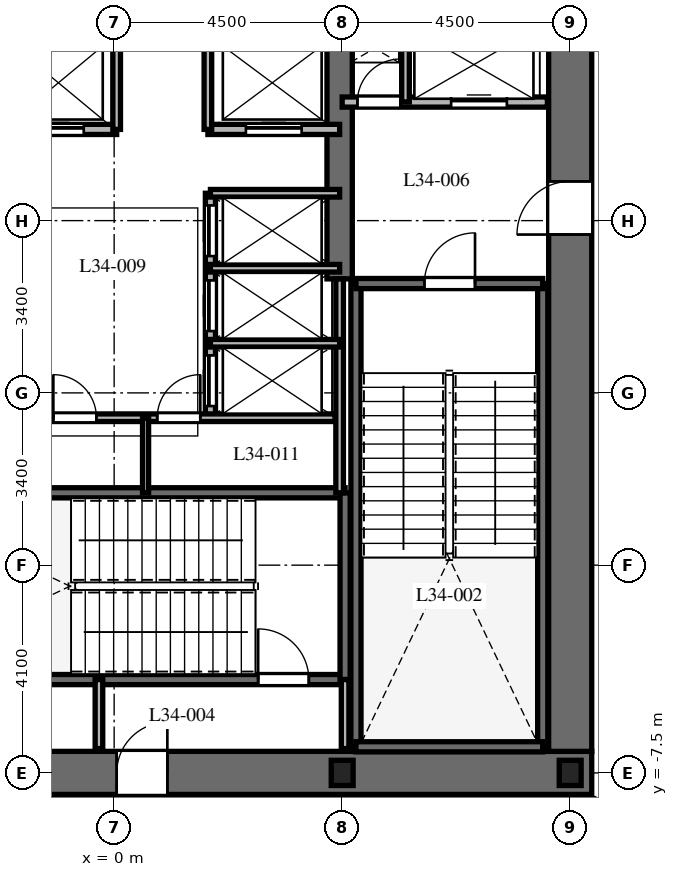
"""IFC4 building model, lengths in metres.
Left out: names, types, materials, properties, quantities, classifications, styles, units other than length and angle.
Written with IfcOpenShell. Run it as: python <this file> out.ifc"""

import sys

from ifc_helpers import new_model, si_unit, direction, frame, frame_2d, origin, origin_2d, place, context, subcontext, project, spatial, rectangle, i_section, extrude, element, fill, save


model = new_model("IFC4")
c1 = context("Model", 3, precision=1e-05, world=origin(), true_north=direction((0.0, 1.0)))
c2 = subcontext(c1, "Body", "Model", "MODEL_VIEW")
j1 = project(units=[si_unit("LENGTHUNIT", "METRE"), si_unit("PLANEANGLEUNIT", "RADIAN")], contexts=[c1])
p1 = place(None, origin())
s1 = spatial("IfcSite", under=j1, at=p1, CompositionType="ELEMENT")
p2 = place(p1, origin())
s2 = spatial("IfcBuilding", under=s1, at=p2, CompositionType="ELEMENT")
p3 = place(p2, frame((0.0, 0.0, 139.5)))
s3 = spatial("IfcBuildingStorey", under=s2, at=p3, CompositionType="ELEMENT", Elevation=139.5)
p4 = place(p3, frame((-9.425, -7.5, 0.0), z_axis=(0.0, 0.0, 1.0), x_axis=(1.0, 0.0, 0.0)))
e1 = element("IfcWall", 1, at=p4, inside=s3, PredefinedType="SHEAR", context=c2, shape_type="SweptSolid", body=[
    extrude(rectangle(XDim=18.85, YDim=0.85, at=frame_2d((9.425, 0.0))), origin(), (0.0, 0.0, 1.0), 4.8),
])
p5 = place(p4, frame((9.475, 0.0, 0.0)))
e2 = element("IfcOpeningElement", 2, at=p5, cuts=e1, PredefinedType="OPENING", context=c2, shape_type="SweptSolid", body=[
    extrude(rectangle(XDim=1.0, YDim=2.15, at=frame_2d((0.5, 1.075))), frame((0.0, 0.435, 0.0), z_axis=(0.0, -1.0, 0.0), x_axis=(1.0, 0.0, 0.0)), (0.0, 0.0, 1.0), 0.87),
])
p6 = place(p3, frame((9.0, -7.075, 0.0), z_axis=(0.0, 0.0, 1.0), x_axis=(0.0, 1.0, 0.0)))
e3 = element("IfcWall", 3, at=p6, inside=s3, PredefinedType="SHEAR", context=c2, shape_type="SweptSolid", body=[
    extrude(rectangle(XDim=14.15, YDim=0.85, at=frame_2d((7.075, 0.0))), origin(), (0.0, 0.0, 1.0), 4.8),
])
p7 = place(p6, frame((10.2, 0.0, 0.0)))
e4 = element("IfcOpeningElement", 4, at=p7, cuts=e3, PredefinedType="OPENING", context=c2, shape_type="SweptSolid", body=[
    extrude(rectangle(XDim=1.05, YDim=2.15, at=frame_2d((0.525, 1.075))), frame((0.0, 0.435, 0.0), z_axis=(0.0, -1.0, 0.0), x_axis=(1.0, 0.0, 0.0)), (0.0, 0.0, 1.0), 0.87),
])
p8 = place(p3, frame((4.45, 2.25, 0.0), z_axis=(0.0, 0.0, 1.0), x_axis=(0.0, 1.0, 0.0)))
e5 = element("IfcWall", 5, at=p8, inside=s3, PredefinedType="SHEAR", context=c2, shape_type="SweptSolid", body=[
    extrude(rectangle(XDim=4.825, YDim=0.5, at=frame_2d((2.413, 0.0))), origin(), (0.0, 0.0, 1.0), 4.8),
])
for number, where, z_axis, x_axis in (
    (6, (4.772, -6.985, 0.0), (0.0, 0.0, 1.0), (0.0, 1.0, 0.0)),
    (7, (8.458, -6.985, 0.0), (0.0, 0.0, 1.0), (0.0, 1.0, 0.0)),
):
    element("IfcWall", number, at=place(p3, frame(where, z_axis=z_axis, x_axis=x_axis)), inside=s3, PredefinedType="SHEAR", context=c2, shape_type="SweptSolid", body=[
        extrude(rectangle(XDim=9.143, YDim=0.2, at=frame_2d((4.572, 0.0))), origin(), (0.0, 0.0, 1.0), 4.8),
    ])
p9 = place(p3, frame((4.772, -6.985, 0.0), z_axis=(0.0, 0.0, 1.0), x_axis=(1.0, 0.0, 0.0)))
e8 = element("IfcWall", 8, at=p9, inside=s3, PredefinedType="SHEAR", context=c2, shape_type="SweptSolid", body=[
    extrude(rectangle(XDim=3.686, YDim=0.2, at=frame_2d((1.843, 0.0))), origin(), (0.0, 0.0, 1.0), 4.8),
])
p10 = place(p3, frame((4.772, 2.158, 0.0), z_axis=(0.0, 0.0, 1.0), x_axis=(1.0, 0.0, 0.0)))
e9 = element("IfcWall", 9, at=p10, inside=s3, PredefinedType="SHEAR", context=c2, shape_type="SweptSolid", body=[
    extrude(rectangle(XDim=3.686, YDim=0.2, at=frame_2d((1.843, 0.0))), origin(), (0.0, 0.0, 1.0), 4.8),
])
p11 = place(p10, frame((1.35, 0.0, 0.0)))
e10 = element("IfcOpeningElement", 10, at=p11, cuts=e9, PredefinedType="OPENING", context=c2, shape_type="SweptSolid", body=[
    extrude(rectangle(XDim=1.0, YDim=2.15, at=frame_2d((0.5, 1.075))), frame((0.0, 0.11, 0.0), z_axis=(0.0, -1.0, 0.0), x_axis=(1.0, 0.0, 0.0)), (0.0, 0.0, 1.0), 0.22),
])
p12 = place(p3, frame((-4.608, -5.658, 0.0), z_axis=(0.0, 0.0, 1.0), x_axis=(1.0, 0.0, 0.0)))
e11 = element("IfcWall", 11, at=p12, inside=s3, PredefinedType="SHEAR", context=c2, shape_type="SweptSolid", body=[
    extrude(rectangle(XDim=9.166, YDim=0.2, at=frame_2d((4.583, 0.0))), origin(), (0.0, 0.0, 1.0), 4.8),
])
p13 = place(p12, frame((7.45, 0.0, 0.0)))
e12 = element("IfcOpeningElement", 12, at=p13, cuts=e11, PredefinedType="OPENING", context=c2, shape_type="SweptSolid", body=[
    extrude(rectangle(XDim=1.0, YDim=2.15, at=frame_2d((0.5, 1.075))), frame((0.0, 0.11, 0.0), z_axis=(0.0, -1.0, 0.0), x_axis=(1.0, 0.0, 0.0)), (0.0, 0.0, 1.0), 0.22),
])
p14 = place(p3, frame((-4.608, -1.972, 0.0), z_axis=(0.0, 0.0, 1.0), x_axis=(1.0, 0.0, 0.0)))
e13 = element("IfcWall", 13, at=p14, inside=s3, PredefinedType="SHEAR", context=c2, shape_type="SweptSolid", body=[
    extrude(rectangle(XDim=9.166, YDim=0.2, at=frame_2d((4.583, 0.0))), origin(), (0.0, 0.0, 1.0), 4.8),
])
p15 = place(p3, frame((4.558, -5.658, 0.0), z_axis=(0.0, 0.0, 1.0), x_axis=(0.0, 1.0, 0.0)))
e14 = element("IfcWall", 14, at=p15, inside=s3, PredefinedType="SHEAR", context=c2, shape_type="SweptSolid", body=[
    extrude(rectangle(XDim=3.686, YDim=0.2, at=frame_2d((1.843, 0.0))), origin(), (0.0, 0.0, 1.0), 4.8),
])
for number, where, z_axis, x_axis in (
    (15, (4.5, -7.5, 0.0), (0.0, 0.0, 1.0), (1.0, 0.0, 0.0)),
    (16, (9.0, -7.5, 0.0), (0.0, 0.0, 1.0), (1.0, 0.0, 0.0)),
):
    element("IfcColumn", number, at=place(p3, frame(where, z_axis=z_axis, x_axis=x_axis)), inside=s3, PredefinedType="COLUMN", context=c2, shape_type="SweptSolid", body=[
        extrude(i_section(OverallWidth=0.432, OverallDepth=0.498, WebThickness=0.056, FlangeThickness=0.089, at=origin_2d()), origin(), (0.0, 0.0, 1.0), 4.8),
    ])
for number, where, z_axis, x_axis in (
    (17, (-0.3, -7.02, 0.0), (0.0, 0.0, 1.0), (0.0, 1.0, 0.0)),
    (18, (4.558, -7.02, 0.0), (0.0, 0.0, 1.0), (0.0, 1.0, 0.0)),
):
    element("IfcWall", number, at=place(p3, frame(where, z_axis=z_axis, x_axis=x_axis)), inside=s3, PredefinedType="PARTITIONING", context=c2, shape_type="SweptSolid", body=[
        extrude(rectangle(XDim=1.362, YDim=0.15, at=frame_2d((0.681, 0.0))), origin(), (0.0, 0.0, 1.0), 4.5),
    ])
p16 = place(p3, frame((4.5, 5.74, 0.0), z_axis=(0.0, 0.0, 1.0), x_axis=(1.0, 0.0, 0.0)))
e19 = element("IfcWall", 19, at=p16, inside=s3, PredefinedType="PARTITIONING", context=c2, shape_type="SweptSolid", body=[
    extrude(rectangle(XDim=4.05, YDim=0.2, at=frame_2d((2.025, 0.0))), origin(), (0.0, 0.0, 1.0), 4.5),
])
p17 = place(p16, frame((0.3, 0.0, 0.0)))
e20 = element("IfcOpeningElement", 20, at=p17, cuts=e19, PredefinedType="OPENING", context=c2, shape_type="SweptSolid", body=[
    extrude(rectangle(XDim=0.85, YDim=2.03, at=frame_2d((0.425, 1.015))), frame((0.0, 0.11, 0.0), z_axis=(0.0, -1.0, 0.0), x_axis=(1.0, 0.0, 0.0)), (0.0, 0.0, 1.0), 0.22),
])
p18 = place(p16, frame((2.15, 0.0, 0.0)))
e21 = element("IfcOpeningElement", 21, at=p18, cuts=e19, PredefinedType="OPENING", context=c2, shape_type="SweptSolid", body=[
    extrude(rectangle(XDim=1.1, YDim=2.2, at=frame_2d((0.55, 1.1))), frame((0.0, 0.11, 0.0), z_axis=(0.0, -1.0, 0.0), x_axis=(1.0, 0.0, 0.0)), (0.0, 0.0, 1.0), 0.22),
])
p19 = place(p3, frame((5.75, 5.74, 0.0), z_axis=(0.0, 0.0, 1.0), x_axis=(0.0, 1.0, 0.0)))
e22 = element("IfcWall", 22, at=p19, inside=s3, PredefinedType="PARTITIONING", context=c2, shape_type="SweptSolid", body=[
    extrude(rectangle(XDim=1.41, YDim=0.15, at=frame_2d((0.705, 0.0))), origin(), (0.0, 0.0, 1.0), 4.5),
])
p20 = place(p3, frame((-4.45, 5.2, 0.0), z_axis=(0.0, 0.0, 1.0), x_axis=(1.0, 0.0, 0.0)))
e23 = element("IfcWall", 23, at=p20, inside=s3, PredefinedType="PARTITIONING", context=c2, shape_type="SweptSolid", body=[
    extrude(rectangle(XDim=4.5, YDim=0.2, at=frame_2d((2.25, 0.0))), origin(), (0.0, 0.0, 1.0), 4.5),
])
p21 = place(p20, frame((0.65, 0.0, 0.0)))
e24 = element("IfcOpeningElement", 24, at=p21, cuts=e23, PredefinedType="OPENING", context=c2, shape_type="SweptSolid", body=[
    extrude(rectangle(XDim=1.0, YDim=2.2, at=frame_2d((0.5, 1.1))), frame((0.0, 0.11, 0.0), z_axis=(0.0, -1.0, 0.0), x_axis=(1.0, 0.0, 0.0)), (0.0, 0.0, 1.0), 0.22),
])
p22 = place(p20, frame((2.85, 0.0, 0.0)))
e25 = element("IfcOpeningElement", 25, at=p22, cuts=e23, PredefinedType="OPENING", context=c2, shape_type="SweptSolid", body=[
    extrude(rectangle(XDim=1.0, YDim=2.2, at=frame_2d((0.5, 1.1))), frame((0.0, 0.11, 0.0), z_axis=(0.0, -1.0, 0.0), x_axis=(1.0, 0.0, 0.0)), (0.0, 0.0, 1.0), 0.22),
])
p23 = place(p3, frame((1.85, 5.2, 0.0), z_axis=(0.0, 0.0, 1.0), x_axis=(1.0, 0.0, 0.0)))
e26 = element("IfcWall", 26, at=p23, inside=s3, PredefinedType="PARTITIONING", context=c2, shape_type="SweptSolid", body=[
    extrude(rectangle(XDim=2.6, YDim=0.2, at=frame_2d((1.3, 0.0))), origin(), (0.0, 0.0, 1.0), 4.5),
])
p24 = place(p23, frame((0.75, 0.0, 0.0)))
e27 = element("IfcOpeningElement", 27, at=p24, cuts=e26, PredefinedType="OPENING", context=c2, shape_type="SweptSolid", body=[
    extrude(rectangle(XDim=1.1, YDim=2.2, at=frame_2d((0.55, 1.1))), frame((0.0, 0.11, 0.0), z_axis=(0.0, -1.0, 0.0), x_axis=(1.0, 0.0, 0.0)), (0.0, 0.0, 1.0), 0.22),
])
for number, where, z_axis, x_axis in (
    (28, (0.05, 5.2, 0.0), (0.0, 0.0, 1.0), (0.0, 1.0, 0.0)),
    (29, (1.85, 5.2, 0.0), (0.0, 0.0, 1.0), (0.0, 1.0, 0.0)),
):
    element("IfcWall", number, at=place(p3, frame(where, z_axis=z_axis, x_axis=x_axis)), inside=s3, PredefinedType="PARTITIONING", context=c2, shape_type="SweptSolid", body=[
        extrude(rectangle(XDim=1.95, YDim=0.15, at=frame_2d((0.975, 0.0))), origin(), (0.0, 0.0, 1.0), 4.5),
    ])
p25 = place(p3, frame((4.45, -1.972, 0.0), z_axis=(0.0, 0.0, 1.0), x_axis=(0.0, 1.0, 0.0)))
e30 = element("IfcWall", 30, at=p25, inside=s3, PredefinedType="PARTITIONING", context=c2, shape_type="SweptSolid", body=[
    extrude(rectangle(XDim=4.222, YDim=0.15, at=frame_2d((2.111, 0.0))), origin(), (0.0, 0.0, 1.0), 4.5),
])
p26 = place(p3, frame((1.9, -0.5, 0.0), z_axis=(0.0, 0.0, 1.0), x_axis=(0.0, 1.0, 0.0)))
e31 = element("IfcWall", 31, at=p26, inside=s3, PredefinedType="PARTITIONING", context=c2, shape_type="SweptSolid", body=[
    extrude(rectangle(XDim=4.44, YDim=0.2, at=frame_2d((2.22, 0.0))), origin(), (0.0, 0.0, 1.0), 4.5),
])
p27 = place(p26, frame((0.24, 0.0, 0.0)))
e32 = element("IfcOpeningElement", 32, at=p27, cuts=e31, PredefinedType="OPENING", context=c2, shape_type="SweptSolid", body=[
    extrude(rectangle(XDim=1.0, YDim=2.2, at=frame_2d((0.5, 1.1))), frame((0.0, 0.11, 0.0), z_axis=(0.0, -1.0, 0.0), x_axis=(1.0, 0.0, 0.0)), (0.0, 0.0, 1.0), 0.22),
])
p28 = place(p26, frame((1.72, 0.0, 0.0)))
e33 = element("IfcOpeningElement", 33, at=p28, cuts=e31, PredefinedType="OPENING", context=c2, shape_type="SweptSolid", body=[
    extrude(rectangle(XDim=1.0, YDim=2.2, at=frame_2d((0.5, 1.1))), frame((0.0, 0.11, 0.0), z_axis=(0.0, -1.0, 0.0), x_axis=(1.0, 0.0, 0.0)), (0.0, 0.0, 1.0), 0.22),
])
p29 = place(p26, frame((3.2, 0.0, 0.0)))
e34 = element("IfcOpeningElement", 34, at=p29, cuts=e31, PredefinedType="OPENING", context=c2, shape_type="SweptSolid", body=[
    extrude(rectangle(XDim=1.0, YDim=2.2, at=frame_2d((0.5, 1.1))), frame((0.0, 0.11, 0.0), z_axis=(0.0, -1.0, 0.0), x_axis=(1.0, 0.0, 0.0)), (0.0, 0.0, 1.0), 0.22),
])
for number, where, z_axis, x_axis in (
    (35, (1.9, 3.94, 0.0), (0.0, 0.0, 1.0), (1.0, 0.0, 0.0)),
    (36, (1.9, 0.98, 0.0), (0.0, 0.0, 1.0), (1.0, 0.0, 0.0)),
    (37, (1.9, 2.46, 0.0), (0.0, 0.0, 1.0), (1.0, 0.0, 0.0)),
):
    element("IfcWall", number, at=place(p3, frame(where, z_axis=z_axis, x_axis=x_axis)), inside=s3, PredefinedType="PARTITIONING", context=c2, shape_type="SweptSolid", body=[
        extrude(rectangle(XDim=2.55, YDim=0.15, at=frame_2d((1.275, 0.0))), origin(), (0.0, 0.0, 1.0), 4.5),
    ])
p30 = place(p3, frame((-4.36, -0.49, 0.0), z_axis=(0.0, 0.0, 1.0), x_axis=(1.0, 0.0, 0.0)))
e38 = element("IfcWall", 38, at=p30, inside=s3, PredefinedType="PARTITIONING", context=c2, shape_type="SweptSolid", body=[
    extrude(rectangle(XDim=8.72, YDim=0.15, at=frame_2d((4.36, 0.0))), origin(), (0.0, 0.0, 1.0), 4.5),
])
p31 = place(p30, frame((3.16, 0.0, 0.0)))
e39 = element("IfcOpeningElement", 39, at=p31, cuts=e38, PredefinedType="OPENING", context=c2, shape_type="SweptSolid", body=[
    extrude(rectangle(XDim=0.85, YDim=2.03, at=frame_2d((0.425, 1.015))), frame((0.0, 0.085, 0.0), z_axis=(0.0, -1.0, 0.0), x_axis=(1.0, 0.0, 0.0)), (0.0, 0.0, 1.0), 0.17),
])
p32 = place(p30, frame((5.21, 0.0, 0.0)))
e40 = element("IfcOpeningElement", 40, at=p32, cuts=e38, PredefinedType="OPENING", context=c2, shape_type="SweptSolid", body=[
    extrude(rectangle(XDim=0.85, YDim=2.03, at=frame_2d((0.425, 1.015))), frame((0.0, 0.085, 0.0), z_axis=(0.0, -1.0, 0.0), x_axis=(1.0, 0.0, 0.0)), (0.0, 0.0, 1.0), 0.17),
])
p33 = place(p3, frame((0.62, -1.972, 0.0), z_axis=(0.0, 0.0, 1.0), x_axis=(0.0, 1.0, 0.0)))
e41 = element("IfcWall", 41, at=p33, inside=s3, PredefinedType="PARTITIONING", context=c2, shape_type="SweptSolid", body=[
    extrude(rectangle(XDim=1.472, YDim=0.12, at=frame_2d((0.736, 0.0))), origin(), (0.0, 0.0, 1.0), 4.5),
])
p34 = place(p11, origin())
e42 = element("IfcDoor", 42, at=p34, inside=s3, OperationType="SINGLE_SWING_RIGHT", PredefinedType="DOOR", context=c2, shape_type="SweptSolid", body=[
    extrude(rectangle(XDim=1.0, YDim=2.15, at=frame_2d((0.5, 1.075))), frame((0.0, 0.025, 0.0), z_axis=(0.0, -1.0, 0.0), x_axis=(1.0, 0.0, 0.0)), (0.0, 0.0, 1.0), 0.05),
])
fill(e10, e42)
p35 = place(p13, origin())
e43 = element("IfcDoor", 43, at=p35, inside=s3, OperationType="SINGLE_SWING_LEFT", PredefinedType="DOOR", context=c2, shape_type="SweptSolid", body=[
    extrude(rectangle(XDim=1.0, YDim=2.15, at=frame_2d((0.5, 1.075))), frame((0.0, 0.025, 0.0), z_axis=(0.0, -1.0, 0.0), x_axis=(1.0, 0.0, 0.0)), (0.0, 0.0, 1.0), 0.05),
])
fill(e12, e43)
p36 = place(p5, origin())
e44 = element("IfcDoor", 44, at=p36, inside=s3, OperationType="SINGLE_SWING_RIGHT", PredefinedType="DOOR", context=c2, shape_type="SweptSolid", body=[
    extrude(rectangle(XDim=1.0, YDim=2.15, at=frame_2d((0.5, 1.075))), frame((0.0, 0.025, 0.0), z_axis=(0.0, -1.0, 0.0), x_axis=(1.0, 0.0, 0.0)), (0.0, 0.0, 1.0), 0.05),
])
fill(e2, e44)
p37 = place(p7, origin())
e45 = element("IfcDoor", 45, at=p37, inside=s3, OperationType="SINGLE_SWING_LEFT", PredefinedType="DOOR", context=c2, shape_type="SweptSolid", body=[
    extrude(rectangle(XDim=1.05, YDim=2.15, at=frame_2d((0.525, 1.075))), frame((0.0, 0.025, 0.0), z_axis=(0.0, -1.0, 0.0), x_axis=(1.0, 0.0, 0.0)), (0.0, 0.0, 1.0), 0.05),
])
fill(e4, e45)
p38 = place(p17, origin())
e46 = element("IfcDoor", 46, at=p38, inside=s3, OperationType="SINGLE_SWING_RIGHT", PredefinedType="DOOR", context=c2, shape_type="SweptSolid", body=[
    extrude(rectangle(XDim=0.85, YDim=2.03, at=frame_2d((0.425, 1.015))), frame((0.0, 0.025, 0.0), z_axis=(0.0, -1.0, 0.0), x_axis=(1.0, 0.0, 0.0)), (0.0, 0.0, 1.0), 0.05),
])
fill(e20, e46)
p39 = place(p18, origin())
e47 = element("IfcDoor", 47, at=p39, inside=s3, OperationType="SLIDING_TO_RIGHT", PredefinedType="DOOR", context=c2, shape_type="SweptSolid", body=[
    extrude(rectangle(XDim=1.1, YDim=2.2, at=frame_2d((0.55, 1.1))), frame((0.0, 0.025, 0.0), z_axis=(0.0, -1.0, 0.0), x_axis=(1.0, 0.0, 0.0)), (0.0, 0.0, 1.0), 0.05),
])
fill(e21, e47)
p40 = place(p22, origin())
e48 = element("IfcDoor", 48, at=p40, inside=s3, OperationType="SLIDING_TO_RIGHT", PredefinedType="DOOR", context=c2, shape_type="SweptSolid", body=[
    extrude(rectangle(XDim=1.0, YDim=2.2, at=frame_2d((0.5, 1.1))), frame((0.0, 0.025, 0.0), z_axis=(0.0, -1.0, 0.0), x_axis=(1.0, 0.0, 0.0)), (0.0, 0.0, 1.0), 0.05),
])
fill(e25, e48)
p41 = place(p24, origin())
e49 = element("IfcDoor", 49, at=p41, inside=s3, OperationType="SLIDING_TO_RIGHT", PredefinedType="DOOR", context=c2, shape_type="SweptSolid", body=[
    extrude(rectangle(XDim=1.1, YDim=2.2, at=frame_2d((0.55, 1.1))), frame((0.0, 0.025, 0.0), z_axis=(0.0, -1.0, 0.0), x_axis=(1.0, 0.0, 0.0)), (0.0, 0.0, 1.0), 0.05),
])
fill(e27, e49)
p42 = place(p27, origin())
e50 = element("IfcDoor", 50, at=p42, inside=s3, OperationType="SLIDING_TO_RIGHT", PredefinedType="DOOR", context=c2, shape_type="SweptSolid", body=[
    extrude(rectangle(XDim=1.0, YDim=2.2, at=frame_2d((0.5, 1.1))), frame((0.0, 0.025, 0.0), z_axis=(0.0, -1.0, 0.0), x_axis=(1.0, 0.0, 0.0)), (0.0, 0.0, 1.0), 0.05),
])
fill(e32, e50)
p43 = place(p28, origin())
e51 = element("IfcDoor", 51, at=p43, inside=s3, OperationType="SLIDING_TO_RIGHT", PredefinedType="DOOR", context=c2, shape_type="SweptSolid", body=[
    extrude(rectangle(XDim=1.0, YDim=2.2, at=frame_2d((0.5, 1.1))), frame((0.0, 0.025, 0.0), z_axis=(0.0, -1.0, 0.0), x_axis=(1.0, 0.0, 0.0)), (0.0, 0.0, 1.0), 0.05),
])
fill(e33, e51)
p44 = place(p29, origin())
e52 = element("IfcDoor", 52, at=p44, inside=s3, OperationType="SLIDING_TO_RIGHT", PredefinedType="DOOR", context=c2, shape_type="SweptSolid", body=[
    extrude(rectangle(XDim=1.0, YDim=2.2, at=frame_2d((0.5, 1.1))), frame((0.0, 0.025, 0.0), z_axis=(0.0, -1.0, 0.0), x_axis=(1.0, 0.0, 0.0)), (0.0, 0.0, 1.0), 0.05),
])
fill(e34, e52)
p45 = place(p31, origin())
e53 = element("IfcDoor", 53, at=p45, inside=s3, OperationType="SINGLE_SWING_LEFT", PredefinedType="DOOR", context=c2, shape_type="SweptSolid", body=[
    extrude(rectangle(XDim=0.85, YDim=2.03, at=frame_2d((0.425, 1.015))), frame((0.0, 0.025, 0.0), z_axis=(0.0, -1.0, 0.0), x_axis=(1.0, 0.0, 0.0)), (0.0, 0.0, 1.0), 0.05),
])
fill(e39, e53)
p46 = place(p32, origin())
e54 = element("IfcDoor", 54, at=p46, inside=s3, OperationType="SINGLE_SWING_RIGHT", PredefinedType="DOOR", context=c2, shape_type="SweptSolid", body=[
    extrude(rectangle(XDim=0.85, YDim=2.03, at=frame_2d((0.425, 1.015))), frame((0.0, 0.025, 0.0), z_axis=(0.0, -1.0, 0.0), x_axis=(1.0, 0.0, 0.0)), (0.0, 0.0, 1.0), 0.05),
])
fill(e40, e54)
save(model, sys.argv[1])
